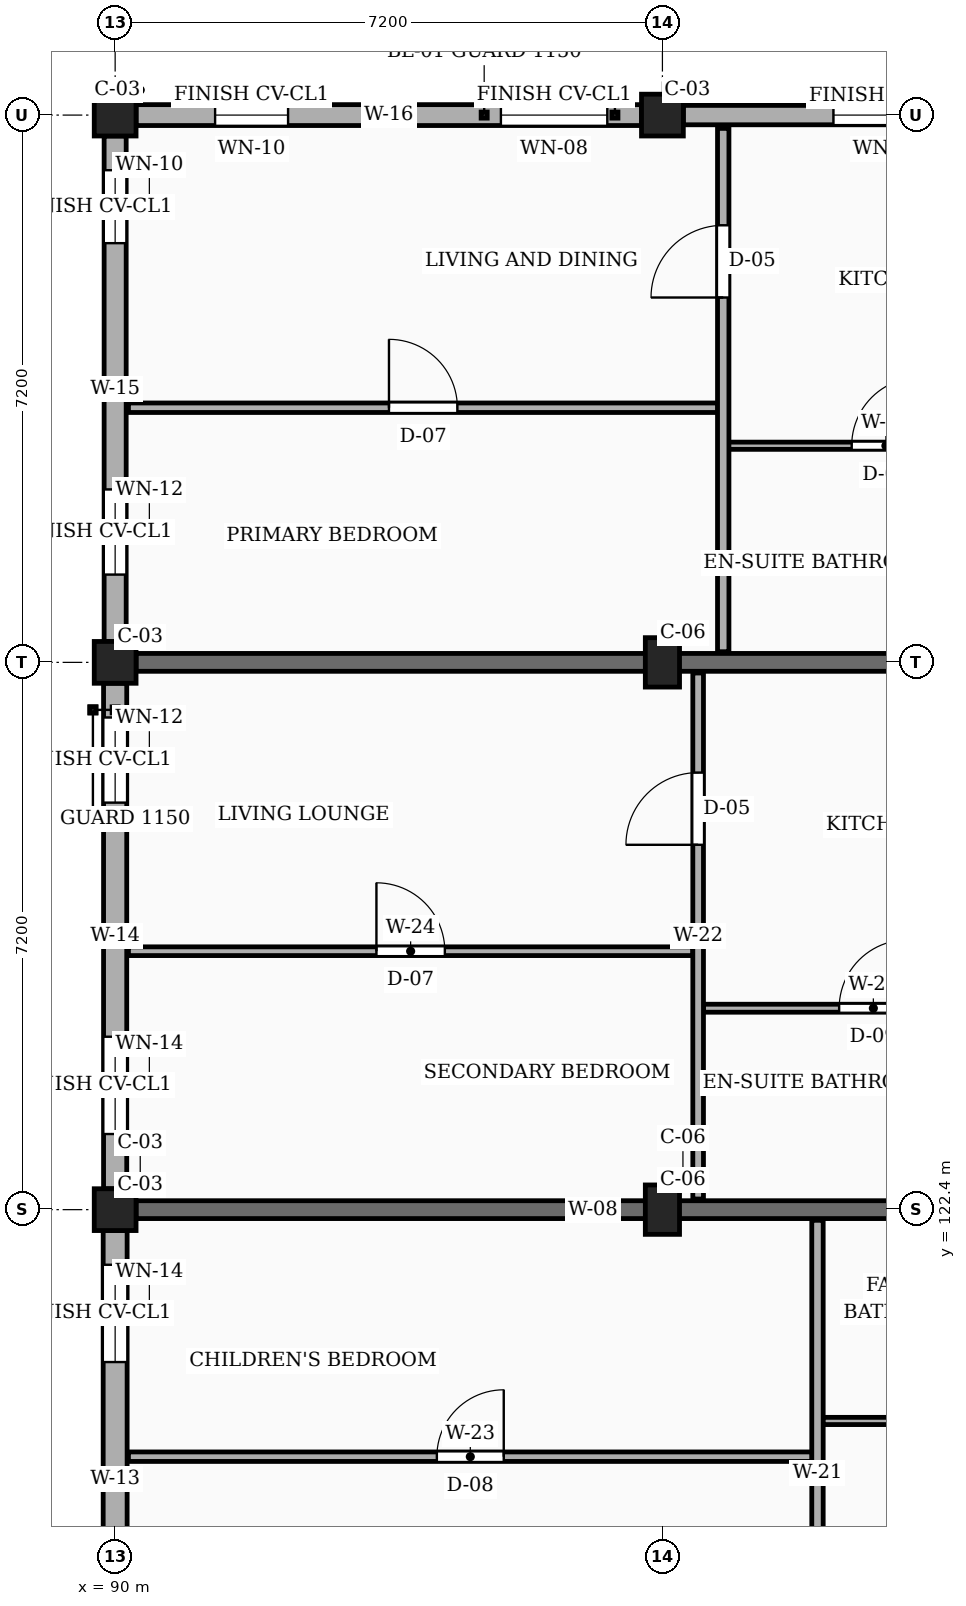
"""IFC4 building model, lengths in metres.
Left out: names, types, materials, properties, quantities, classifications, styles, units other than length and angle.
Written with IfcOpenShell. Run it as: python <this file> out.ifc"""

import sys

from ifc_helpers import new_model, si_unit, direction, frame, frame_2d, origin, origin_2d, place, context, subcontext, project, spatial, rectangle, extrude, element, fill, save


model = new_model("IFC4")
c1 = context("Model", 3, precision=1e-05, world=origin(), true_north=direction((0.0, 1.0)))
c2 = subcontext(c1, "Body", "Model", "MODEL_VIEW")
j1 = project(units=[si_unit("LENGTHUNIT", "METRE"), si_unit("PLANEANGLEUNIT", "RADIAN")], contexts=[c1])
p1 = place(None, origin())
s1 = spatial("IfcSite", under=j1, at=p1, CompositionType="ELEMENT")
p2 = place(p1, origin())
s2 = spatial("IfcBuilding", under=s1, at=p2, CompositionType="ELEMENT")
p3 = place(p2, frame((0.0, 0.0, 13.95)))
s3 = spatial("IfcBuildingStorey", under=s2, at=p3, CompositionType="ELEMENT", Elevation=13.95)
for number, where, z_axis, x_axis in (
    (1, (90.0, 122.4, 0.0), (0.0, 0.0, 1.0), (1.0, 0.0, 0.0)),
    (2, (90.0, 129.6, 0.0), (0.0, 0.0, 1.0), (1.0, 0.0, 0.0)),
    (3, (90.0, 136.8, 0.0), (0.0, 0.0, 1.0), (1.0, 0.0, 0.0)),
):
    element("IfcColumn", number, at=place(p3, frame(where, z_axis=z_axis, x_axis=x_axis)), inside=s3, PredefinedType="COLUMN", context=c2, shape_type="SweptSolid", body=[
        extrude(rectangle(XDim=0.55, YDim=0.55, at=origin_2d()), origin(), (0.0, 0.0, 1.0), 3.15),
    ])
for number, where, z_axis, x_axis in (
    (4, (97.2, 122.4, 0.0), (0.0, 0.0, 1.0), (1.0, 0.0, 0.0)),
    (5, (97.2, 129.6, 0.0), (0.0, 0.0, 1.0), (1.0, 0.0, 0.0)),
):
    element("IfcColumn", number, at=place(p3, frame(where, z_axis=z_axis, x_axis=x_axis)), inside=s3, PredefinedType="COLUMN", context=c2, shape_type="SweptSolid", body=[
        extrude(rectangle(XDim=0.45, YDim=0.65, at=origin_2d()), origin(), (0.0, 0.0, 1.0), 3.15),
    ])
p4 = place(p3, frame((97.2, 136.8, 0.0), z_axis=(0.0, 0.0, 1.0), x_axis=(1.0, 0.0, 0.0)))
e6 = element("IfcColumn", 6, at=p4, inside=s3, PredefinedType="COLUMN", context=c2, shape_type="SweptSolid", body=[
    extrude(rectangle(XDim=0.55, YDim=0.55, at=origin_2d()), origin(), (0.0, 0.0, 1.0), 3.15),
])
for number, where, z_axis, x_axis in (
    (7, (90.275, 122.4, 0.0), (0.0, 0.0, 1.0), (1.0, 0.0, 0.0)),
    (8, (90.275, 129.6, 0.0), (0.0, 0.0, 1.0), (1.0, 0.0, 0.0)),
):
    element("IfcWall", number, at=place(p3, frame(where, z_axis=z_axis, x_axis=x_axis)), inside=s3, PredefinedType="SOLIDWALL", context=c2, shape_type="SweptSolid", body=[
        extrude(rectangle(XDim=12.025, YDim=0.235, at=frame_2d((6.013, 0.0))), origin(), (0.0, 0.0, 1.0), 2.19),
    ])
p5 = place(p3, frame((104.125, 136.8, 0.0), z_axis=(0.0, 0.0, 1.0), x_axis=(-1.0, 0.0, 0.0)))
e9 = element("IfcWall", 9, at=p5, inside=s3, PredefinedType="SOLIDWALL", context=c2, shape_type="SweptSolid", body=[
    extrude(rectangle(XDim=6.65, YDim=0.255, at=frame_2d((3.325, 0.0))), origin(), (0.0, 0.0, 1.0), 2.46),
])
p6 = place(p5, frame((0.462, 0.0, 0.78)))
e10 = element("IfcOpeningElement", 10, at=p6, cuts=e9, PredefinedType="OPENING", context=c2, shape_type="SweptSolid", body=[
    extrude(rectangle(XDim=1.04, YDim=1.26, at=frame_2d((0.52, 0.63))), frame((0.0, 0.137, 0.0), z_axis=(0.0, -1.0, 0.0), x_axis=(1.0, 0.0, 0.0)), (0.0, 0.0, 1.0), 0.275),
])
p7 = place(p5, frame((3.275, 0.0, 0.78)))
e11 = element("IfcOpeningElement", 11, at=p7, cuts=e9, PredefinedType="OPENING", context=c2, shape_type="SweptSolid", body=[
    extrude(rectangle(XDim=1.4, YDim=1.15, at=frame_2d((0.7, 0.575))), frame((0.0, 0.137, 0.0), z_axis=(0.0, -1.0, 0.0), x_axis=(1.0, 0.0, 0.0)), (0.0, 0.0, 1.0), 0.275),
])
p8 = place(p3, frame((96.925, 136.8, 0.0), z_axis=(0.0, 0.0, 1.0), x_axis=(-1.0, 0.0, 0.0)))
e12 = element("IfcWall", 12, at=p8, inside=s3, PredefinedType="SOLIDWALL", context=c2, shape_type="SweptSolid", body=[
    extrude(rectangle(XDim=6.65, YDim=0.275, at=frame_2d((3.325, 0.0))), origin(), (0.0, 0.0, 1.0), 2.46),
])
p9 = place(p8, frame((0.45, 0.0, 0.78)))
e13 = element("IfcOpeningElement", 13, at=p9, cuts=e12, PredefinedType="OPENING", context=c2, shape_type="SweptSolid", body=[
    extrude(rectangle(XDim=1.4, YDim=1.15, at=frame_2d((0.7, 0.575))), frame((0.0, 0.147, 0.0), z_axis=(0.0, -1.0, 0.0), x_axis=(1.0, 0.0, 0.0)), (0.0, 0.0, 1.0), 0.295),
])
p10 = place(p8, frame((4.65, 0.0, 0.78)))
e14 = element("IfcOpeningElement", 14, at=p10, cuts=e12, PredefinedType="OPENING", context=c2, shape_type="SweptSolid", body=[
    extrude(rectangle(XDim=0.96, YDim=1.26, at=frame_2d((0.48, 0.63))), frame((0.0, 0.147, 0.0), z_axis=(0.0, -1.0, 0.0), x_axis=(1.0, 0.0, 0.0)), (0.0, 0.0, 1.0), 0.295),
])
p11 = place(p3, frame((90.0, 136.525, 0.0), z_axis=(0.0, 0.0, 1.0), x_axis=(0.0, -1.0, 0.0)))
e15 = element("IfcWall", 15, at=p11, inside=s3, PredefinedType="SOLIDWALL", context=c2, shape_type="SweptSolid", body=[
    extrude(rectangle(XDim=6.65, YDim=0.29, at=frame_2d((3.325, 0.0))), origin(), (0.0, 0.0, 1.0), 2.46),
])
p12 = place(p11, frame((0.45, 0.0, 0.78)))
e16 = element("IfcOpeningElement", 16, at=p12, cuts=e15, PredefinedType="OPENING", context=c2, shape_type="SweptSolid", body=[
    extrude(rectangle(XDim=0.96, YDim=1.26, at=frame_2d((0.48, 0.63))), frame((0.0, 0.155, 0.0), z_axis=(0.0, -1.0, 0.0), x_axis=(1.0, 0.0, 0.0)), (0.0, 0.0, 1.0), 0.31),
])
p13 = place(p11, frame((4.65, 0.0, 0.78)))
e17 = element("IfcOpeningElement", 17, at=p13, cuts=e15, PredefinedType="OPENING", context=c2, shape_type="SweptSolid", body=[
    extrude(rectangle(XDim=1.12, YDim=1.26, at=frame_2d((0.56, 0.63))), frame((0.0, 0.155, 0.0), z_axis=(0.0, -1.0, 0.0), x_axis=(1.0, 0.0, 0.0)), (0.0, 0.0, 1.0), 0.31),
])
p14 = place(p3, frame((90.0, 129.325, 0.0), z_axis=(0.0, 0.0, 1.0), x_axis=(0.0, -1.0, 0.0)))
e18 = element("IfcWall", 18, at=p14, inside=s3, PredefinedType="SOLIDWALL", context=c2, shape_type="SweptSolid", body=[
    extrude(rectangle(XDim=6.65, YDim=0.305, at=frame_2d((3.325, 0.0))), origin(), (0.0, 0.0, 1.0), 2.46),
])
p15 = place(p14, frame((0.45, 0.0, 0.78)))
e19 = element("IfcOpeningElement", 19, at=p15, cuts=e18, PredefinedType="OPENING", context=c2, shape_type="SweptSolid", body=[
    extrude(rectangle(XDim=1.12, YDim=1.26, at=frame_2d((0.56, 0.63))), frame((0.0, 0.163, 0.0), z_axis=(0.0, -1.0, 0.0), x_axis=(1.0, 0.0, 0.0)), (0.0, 0.0, 1.0), 0.325),
])
p16 = place(p14, frame((4.65, 0.0, 0.78)))
e20 = element("IfcOpeningElement", 20, at=p16, cuts=e18, PredefinedType="OPENING", context=c2, shape_type="SweptSolid", body=[
    extrude(rectangle(XDim=1.28, YDim=1.26, at=frame_2d((0.64, 0.63))), frame((0.0, 0.163, 0.0), z_axis=(0.0, -1.0, 0.0), x_axis=(1.0, 0.0, 0.0)), (0.0, 0.0, 1.0), 0.325),
])
p17 = place(p3, frame((90.0, 122.125, 0.0), z_axis=(0.0, 0.0, 1.0), x_axis=(0.0, -1.0, 0.0)))
e21 = element("IfcWall", 21, at=p17, inside=s3, PredefinedType="SOLIDWALL", context=c2, shape_type="SweptSolid", body=[
    extrude(rectangle(XDim=6.65, YDim=0.315, at=frame_2d((3.325, 0.0))), origin(), (0.0, 0.0, 1.0), 2.46),
])
p18 = place(p17, frame((0.45, 0.0, 0.78)))
e22 = element("IfcOpeningElement", 22, at=p18, cuts=e21, PredefinedType="OPENING", context=c2, shape_type="SweptSolid", body=[
    extrude(rectangle(XDim=1.28, YDim=1.26, at=frame_2d((0.64, 0.63))), frame((0.0, 0.167, 0.0), z_axis=(0.0, -1.0, 0.0), x_axis=(1.0, 0.0, 0.0)), (0.0, 0.0, 1.0), 0.335),
])
p19 = place(p17, frame((4.65, 0.0, 0.78)))
e23 = element("IfcOpeningElement", 23, at=p19, cuts=e21, PredefinedType="OPENING", context=c2, shape_type="SweptSolid", body=[
    extrude(rectangle(XDim=1.44, YDim=1.26, at=frame_2d((0.72, 0.63))), frame((0.0, 0.167, 0.0), z_axis=(0.0, -1.0, 0.0), x_axis=(1.0, 0.0, 0.0)), (0.0, 0.0, 1.0), 0.335),
])
p20 = place(p3, frame((90.175, 119.15, 0.0), z_axis=(0.0, 0.0, 1.0), x_axis=(1.0, 0.0, 0.0)))
e24 = element("IfcWall", 24, at=p20, inside=s3, PredefinedType="PARTITIONING", context=c2, shape_type="SweptSolid", body=[
    extrude(rectangle(XDim=8.995, YDim=0.125, at=frame_2d((4.498, 0.0))), origin(), (0.0, 0.0, 1.0), 2.325),
])
p21 = place(p20, frame((4.058, 0.0, 0.0)))
e25 = element("IfcOpeningElement", 25, at=p21, cuts=e24, PredefinedType="OPENING", context=c2, shape_type="SweptSolid", body=[
    extrude(rectangle(XDim=0.88, YDim=2.08, at=frame_2d((0.44, 1.04))), frame((0.0, 0.073, 0.0), z_axis=(0.0, -1.0, 0.0), x_axis=(1.0, 0.0, 0.0)), (0.0, 0.0, 1.0), 0.145),
])
p22 = place(p3, frame((99.31, 119.62, 0.0), z_axis=(0.0, 0.0, 1.0), x_axis=(1.0, 0.0, 0.0)))
e26 = element("IfcWall", 26, at=p22, inside=s3, PredefinedType="PARTITIONING", context=c2, shape_type="SweptSolid", body=[
    extrude(rectangle(XDim=2.9, YDim=0.095, at=frame_2d((1.45, 0.0))), origin(), (0.0, 0.0, 1.0), 2.325),
])
p23 = place(p22, frame((1.015, 0.0, 0.0)))
e27 = element("IfcOpeningElement", 27, at=p23, cuts=e26, PredefinedType="OPENING", context=c2, shape_type="SweptSolid", body=[
    extrude(rectangle(XDim=0.87, YDim=2.05, at=frame_2d((0.435, 1.025))), frame((0.0, 0.058, 0.0), z_axis=(0.0, -1.0, 0.0), x_axis=(1.0, 0.0, 0.0)), (0.0, 0.0, 1.0), 0.115),
])
p24 = place(p3, frame((99.24, 115.34, 0.0), z_axis=(0.0, 0.0, 1.0), x_axis=(0.0, 1.0, 0.0)))
e28 = element("IfcWall", 28, at=p24, inside=s3, PredefinedType="PARTITIONING", context=c2, shape_type="SweptSolid", body=[
    extrude(rectangle(XDim=6.92, YDim=0.15, at=frame_2d((3.46, 0.0))), origin(), (0.0, 0.0, 1.0), 2.325),
])
p25 = place(p24, frame((1.31, 0.0, 0.0)))
e29 = element("IfcOpeningElement", 29, at=p25, cuts=e28, PredefinedType="OPENING", context=c2, shape_type="SweptSolid", body=[
    extrude(rectangle(XDim=0.92, YDim=2.1, at=frame_2d((0.46, 1.05))), frame((0.0, 0.085, 0.0), z_axis=(0.0, -1.0, 0.0), x_axis=(1.0, 0.0, 0.0)), (0.0, 0.0, 1.0), 0.17),
])
p26 = place(p3, frame((90.175, 125.8, 0.0), z_axis=(0.0, 0.0, 1.0), x_axis=(1.0, 0.0, 0.0)))
e30 = element("IfcWall", 30, at=p26, inside=s3, PredefinedType="PARTITIONING", context=c2, shape_type="SweptSolid", body=[
    extrude(rectangle(XDim=7.425, YDim=0.115, at=frame_2d((3.712, 0.0))), origin(), (0.0, 0.0, 1.0), 2.325),
])
p27 = place(p26, frame((3.262, 0.0, 0.0)))
e31 = element("IfcOpeningElement", 31, at=p27, cuts=e30, PredefinedType="OPENING", context=c2, shape_type="SweptSolid", body=[
    extrude(rectangle(XDim=0.9, YDim=2.1, at=frame_2d((0.45, 1.05))), frame((0.0, 0.067, 0.0), z_axis=(0.0, -1.0, 0.0), x_axis=(1.0, 0.0, 0.0)), (0.0, 0.0, 1.0), 0.135),
])
p28 = place(p3, frame((97.74, 125.05, 0.0), z_axis=(0.0, 0.0, 1.0), x_axis=(1.0, 0.0, 0.0)))
e32 = element("IfcWall", 32, at=p28, inside=s3, PredefinedType="PARTITIONING", context=c2, shape_type="SweptSolid", body=[
    extrude(rectangle(XDim=4.47, YDim=0.105, at=frame_2d((2.235, 0.0))), origin(), (0.0, 0.0, 1.0), 2.325),
])
p29 = place(p28, frame((1.785, 0.0, 0.0)))
e33 = element("IfcOpeningElement", 33, at=p29, cuts=e32, PredefinedType="OPENING", context=c2, shape_type="SweptSolid", body=[
    extrude(rectangle(XDim=0.9, YDim=2.05, at=frame_2d((0.45, 1.025))), frame((0.0, 0.062, 0.0), z_axis=(0.0, -1.0, 0.0), x_axis=(1.0, 0.0, 0.0)), (0.0, 0.0, 1.0), 0.125),
])
p30 = place(p3, frame((97.67, 122.54, 0.0), z_axis=(0.0, 0.0, 1.0), x_axis=(0.0, 1.0, 0.0)))
e34 = element("IfcWall", 34, at=p30, inside=s3, PredefinedType="PARTITIONING", context=c2, shape_type="SweptSolid", body=[
    extrude(rectangle(XDim=6.92, YDim=0.14, at=frame_2d((3.46, 0.0))), origin(), (0.0, 0.0, 1.0), 2.325),
])
p31 = place(p30, frame((4.66, 0.0, 0.0)))
e35 = element("IfcOpeningElement", 35, at=p31, cuts=e34, PredefinedType="OPENING", context=c2, shape_type="SweptSolid", body=[
    extrude(rectangle(XDim=0.95, YDim=2.1, at=frame_2d((0.475, 1.05))), frame((0.0, 0.08, 0.0), z_axis=(0.0, -1.0, 0.0), x_axis=(1.0, 0.0, 0.0)), (0.0, 0.0, 1.0), 0.16),
])
p32 = place(p3, frame((90.175, 132.95, 0.0), z_axis=(0.0, 0.0, 1.0), x_axis=(1.0, 0.0, 0.0)))
e36 = element("IfcWall", 36, at=p32, inside=s3, PredefinedType="PARTITIONING", context=c2, shape_type="SweptSolid", body=[
    extrude(rectangle(XDim=7.755, YDim=0.125, at=frame_2d((3.877, 0.0))), origin(), (0.0, 0.0, 1.0), 2.325),
])
p33 = place(p32, frame((3.427, 0.0, 0.0)))
e37 = element("IfcOpeningElement", 37, at=p33, cuts=e36, PredefinedType="OPENING", context=c2, shape_type="SweptSolid", body=[
    extrude(rectangle(XDim=0.9, YDim=2.1, at=frame_2d((0.45, 1.05))), frame((0.0, 0.073, 0.0), z_axis=(0.0, -1.0, 0.0), x_axis=(1.0, 0.0, 0.0)), (0.0, 0.0, 1.0), 0.145),
])
p34 = place(p3, frame((98.07, 132.45, 0.0), z_axis=(0.0, 0.0, 1.0), x_axis=(1.0, 0.0, 0.0)))
e38 = element("IfcWall", 38, at=p34, inside=s3, PredefinedType="PARTITIONING", context=c2, shape_type="SweptSolid", body=[
    extrude(rectangle(XDim=4.14, YDim=0.095, at=frame_2d((2.07, 0.0))), origin(), (0.0, 0.0, 1.0), 2.325),
])
p35 = place(p34, frame((1.62, 0.0, 0.0)))
e39 = element("IfcOpeningElement", 39, at=p35, cuts=e38, PredefinedType="OPENING", context=c2, shape_type="SweptSolid", body=[
    extrude(rectangle(XDim=0.9, YDim=2.05, at=frame_2d((0.45, 1.025))), frame((0.0, 0.058, 0.0), z_axis=(0.0, -1.0, 0.0), x_axis=(1.0, 0.0, 0.0)), (0.0, 0.0, 1.0), 0.115),
])
p36 = place(p3, frame((98.0, 129.74, 0.0), z_axis=(0.0, 0.0, 1.0), x_axis=(0.0, 1.0, 0.0)))
e40 = element("IfcWall", 40, at=p36, inside=s3, PredefinedType="PARTITIONING", context=c2, shape_type="SweptSolid", body=[
    extrude(rectangle(XDim=6.885, YDim=0.15, at=frame_2d((3.442, 0.0))), origin(), (0.0, 0.0, 1.0), 2.325),
])
p37 = place(p36, frame((4.66, 0.0, 0.0)))
e41 = element("IfcOpeningElement", 41, at=p37, cuts=e40, PredefinedType="OPENING", context=c2, shape_type="SweptSolid", body=[
    extrude(rectangle(XDim=0.95, YDim=2.1, at=frame_2d((0.475, 1.05))), frame((0.0, 0.085, 0.0), z_axis=(0.0, -1.0, 0.0), x_axis=(1.0, 0.0, 0.0)), (0.0, 0.0, 1.0), 0.17),
])
p38 = place(p7, origin())
e42 = element("IfcWindow", 42, at=p38, inside=s3, PartitioningType="SINGLE_PANEL", PredefinedType="WINDOW", context=c2, shape_type="SweptSolid", body=[
    extrude(rectangle(XDim=1.4, YDim=1.15, at=frame_2d((0.7, 0.575))), frame((0.0, 0.03, 0.0), z_axis=(0.0, -1.0, 0.0), x_axis=(1.0, 0.0, 0.0)), (0.0, 0.0, 1.0), 0.06),
])
fill(e11, e42)
p39 = place(p9, origin())
e43 = element("IfcWindow", 43, at=p39, inside=s3, PartitioningType="SINGLE_PANEL", PredefinedType="WINDOW", context=c2, shape_type="SweptSolid", body=[
    extrude(rectangle(XDim=1.4, YDim=1.15, at=frame_2d((0.7, 0.575))), frame((0.0, 0.03, 0.0), z_axis=(0.0, -1.0, 0.0), x_axis=(1.0, 0.0, 0.0)), (0.0, 0.0, 1.0), 0.06),
])
fill(e13, e43)
p40 = place(p10, origin())
e44 = element("IfcWindow", 44, at=p40, inside=s3, PartitioningType="SINGLE_PANEL", PredefinedType="WINDOW", context=c2, shape_type="SweptSolid", body=[
    extrude(rectangle(XDim=0.96, YDim=1.26, at=frame_2d((0.48, 0.63))), frame((0.0, 0.03, 0.0), z_axis=(0.0, -1.0, 0.0), x_axis=(1.0, 0.0, 0.0)), (0.0, 0.0, 1.0), 0.06),
])
fill(e14, e44)
p41 = place(p12, origin())
e45 = element("IfcWindow", 45, at=p41, inside=s3, PartitioningType="SINGLE_PANEL", PredefinedType="WINDOW", context=c2, shape_type="SweptSolid", body=[
    extrude(rectangle(XDim=0.96, YDim=1.26, at=frame_2d((0.48, 0.63))), frame((0.0, 0.03, 0.0), z_axis=(0.0, -1.0, 0.0), x_axis=(1.0, 0.0, 0.0)), (0.0, 0.0, 1.0), 0.06),
])
fill(e16, e45)
p42 = place(p13, origin())
e46 = element("IfcWindow", 46, at=p42, inside=s3, PartitioningType="SINGLE_PANEL", PredefinedType="WINDOW", context=c2, shape_type="SweptSolid", body=[
    extrude(rectangle(XDim=1.12, YDim=1.26, at=frame_2d((0.56, 0.63))), frame((0.0, 0.03, 0.0), z_axis=(0.0, -1.0, 0.0), x_axis=(1.0, 0.0, 0.0)), (0.0, 0.0, 1.0), 0.06),
])
fill(e17, e46)
p43 = place(p15, origin())
e47 = element("IfcWindow", 47, at=p43, inside=s3, PartitioningType="SINGLE_PANEL", PredefinedType="WINDOW", context=c2, shape_type="SweptSolid", body=[
    extrude(rectangle(XDim=1.12, YDim=1.26, at=frame_2d((0.56, 0.63))), frame((0.0, 0.03, 0.0), z_axis=(0.0, -1.0, 0.0), x_axis=(1.0, 0.0, 0.0)), (0.0, 0.0, 1.0), 0.06),
])
fill(e19, e47)
p44 = place(p16, origin())
e48 = element("IfcWindow", 48, at=p44, inside=s3, PartitioningType="SINGLE_PANEL", PredefinedType="WINDOW", context=c2, shape_type="SweptSolid", body=[
    extrude(rectangle(XDim=1.28, YDim=1.26, at=frame_2d((0.64, 0.63))), frame((0.0, 0.03, 0.0), z_axis=(0.0, -1.0, 0.0), x_axis=(1.0, 0.0, 0.0)), (0.0, 0.0, 1.0), 0.06),
])
fill(e20, e48)
p45 = place(p18, origin())
e49 = element("IfcWindow", 49, at=p45, inside=s3, PartitioningType="SINGLE_PANEL", PredefinedType="WINDOW", context=c2, shape_type="SweptSolid", body=[
    extrude(rectangle(XDim=1.28, YDim=1.26, at=frame_2d((0.64, 0.63))), frame((0.0, 0.03, 0.0), z_axis=(0.0, -1.0, 0.0), x_axis=(1.0, 0.0, 0.0)), (0.0, 0.0, 1.0), 0.06),
])
fill(e22, e49)
p46 = place(p21, origin())
e50 = element("IfcDoor", 50, at=p46, inside=s3, OperationType="SINGLE_SWING_RIGHT", PredefinedType="DOOR", context=c2, shape_type="SweptSolid", body=[
    extrude(rectangle(XDim=0.88, YDim=2.08, at=frame_2d((0.44, 1.04))), frame((0.0, 0.025, 0.0), z_axis=(0.0, -1.0, 0.0), x_axis=(1.0, 0.0, 0.0)), (0.0, 0.0, 1.0), 0.05),
])
fill(e25, e50)
p47 = place(p27, origin())
e51 = element("IfcDoor", 51, at=p47, inside=s3, OperationType="SINGLE_SWING_LEFT", PredefinedType="DOOR", context=c2, shape_type="SweptSolid", body=[
    extrude(rectangle(XDim=0.9, YDim=2.1, at=frame_2d((0.45, 1.05))), frame((0.0, 0.025, 0.0), z_axis=(0.0, -1.0, 0.0), x_axis=(1.0, 0.0, 0.0)), (0.0, 0.0, 1.0), 0.05),
])
fill(e31, e51)
p48 = place(p29, origin())
e52 = element("IfcDoor", 52, at=p48, inside=s3, OperationType="SINGLE_SWING_RIGHT", PredefinedType="DOOR", context=c2, shape_type="SweptSolid", body=[
    extrude(rectangle(XDim=0.9, YDim=2.05, at=frame_2d((0.45, 1.025))), frame((0.0, 0.025, 0.0), z_axis=(0.0, -1.0, 0.0), x_axis=(1.0, 0.0, 0.0)), (0.0, 0.0, 1.0), 0.05),
])
fill(e33, e52)
p49 = place(p31, origin())
e53 = element("IfcDoor", 53, at=p49, inside=s3, OperationType="SINGLE_SWING_LEFT", PredefinedType="DOOR", context=c2, shape_type="SweptSolid", body=[
    extrude(rectangle(XDim=0.95, YDim=2.1, at=frame_2d((0.475, 1.05))), frame((0.0, 0.025, 0.0), z_axis=(0.0, -1.0, 0.0), x_axis=(1.0, 0.0, 0.0)), (0.0, 0.0, 1.0), 0.05),
])
fill(e35, e53)
p50 = place(p33, origin())
e54 = element("IfcDoor", 54, at=p50, inside=s3, OperationType="SINGLE_SWING_LEFT", PredefinedType="DOOR", context=c2, shape_type="SweptSolid", body=[
    extrude(rectangle(XDim=0.9, YDim=2.1, at=frame_2d((0.45, 1.05))), frame((0.0, 0.025, 0.0), z_axis=(0.0, -1.0, 0.0), x_axis=(1.0, 0.0, 0.0)), (0.0, 0.0, 1.0), 0.05),
])
fill(e37, e54)
p51 = place(p35, origin())
e55 = element("IfcDoor", 55, at=p51, inside=s3, OperationType="SINGLE_SWING_RIGHT", PredefinedType="DOOR", context=c2, shape_type="SweptSolid", body=[
    extrude(rectangle(XDim=0.9, YDim=2.05, at=frame_2d((0.45, 1.025))), frame((0.0, 0.025, 0.0), z_axis=(0.0, -1.0, 0.0), x_axis=(1.0, 0.0, 0.0)), (0.0, 0.0, 1.0), 0.05),
])
fill(e39, e55)
p52 = place(p37, origin())
e56 = element("IfcDoor", 56, at=p52, inside=s3, OperationType="SINGLE_SWING_LEFT", PredefinedType="DOOR", context=c2, shape_type="SweptSolid", body=[
    extrude(rectangle(XDim=0.95, YDim=2.1, at=frame_2d((0.475, 1.05))), frame((0.0, 0.025, 0.0), z_axis=(0.0, -1.0, 0.0), x_axis=(1.0, 0.0, 0.0)), (0.0, 0.0, 1.0), 0.05),
])
fill(e41, e56)
save(model, sys.argv[1])
